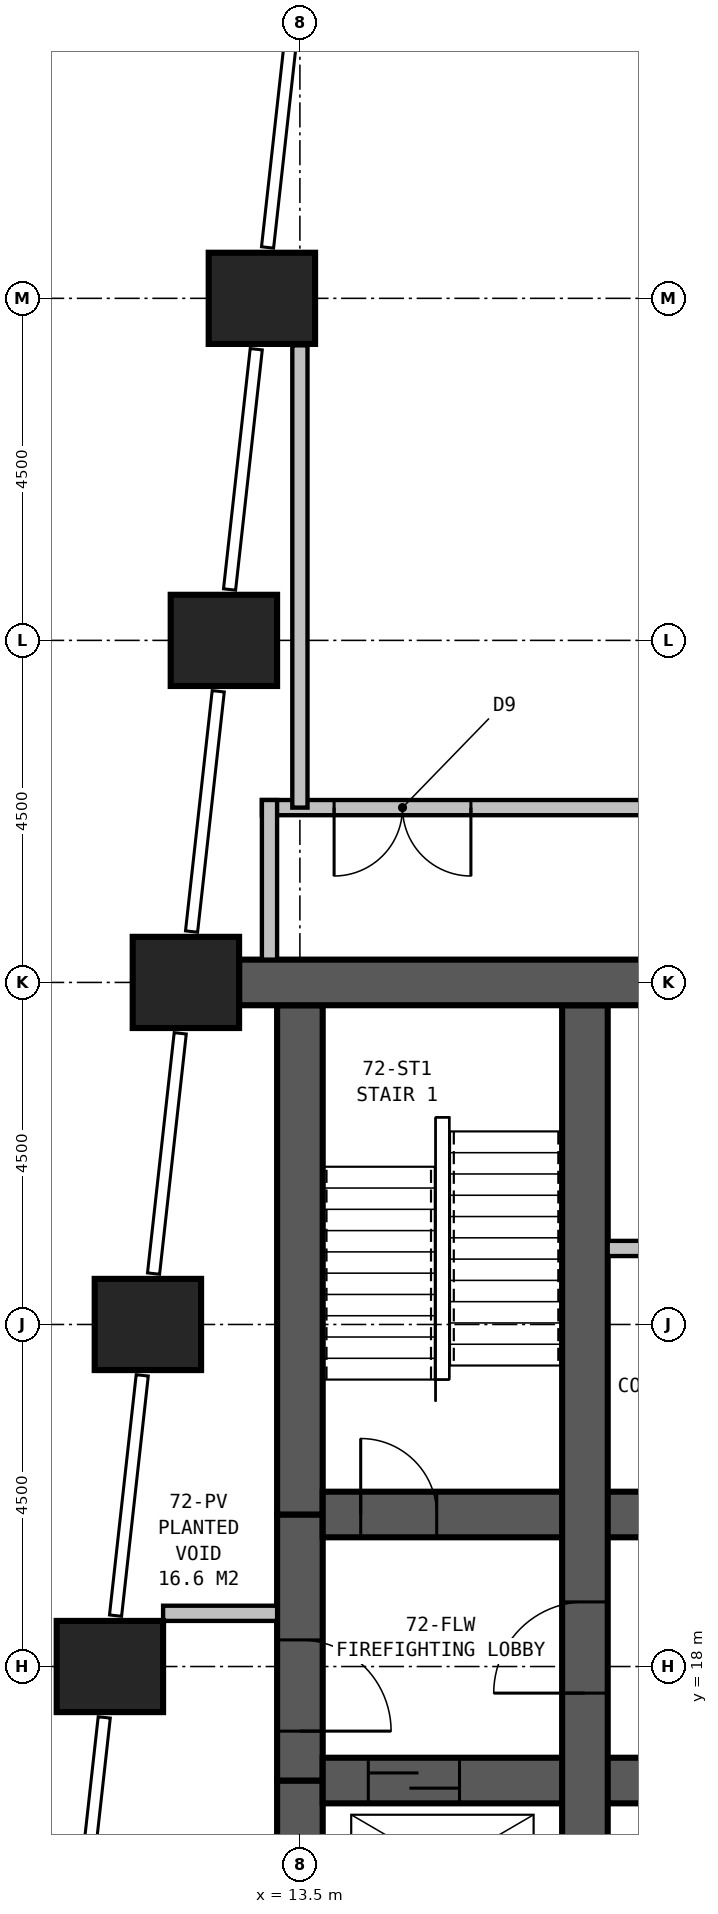
"""IFC4 building model, lengths in metres.
Left out: names, types, materials, properties, quantities, classifications, styles, units other than length and angle.
Written with IfcOpenShell. Run it as: python <this file> out.ifc"""

import sys

from ifc_helpers import new_model, si_unit, direction, frame, frame_2d, origin, origin_2d, place, context, subcontext, project, spatial, rectangle, extrude, element, fill, save


model = new_model("IFC4")
c1 = context("Model", 3, precision=1e-05, world=origin(), true_north=direction((0.0, 1.0)))
c2 = subcontext(c1, "Body", "Model", "MODEL_VIEW")
j1 = project(units=[si_unit("LENGTHUNIT", "METRE"), si_unit("PLANEANGLEUNIT", "RADIAN")], contexts=[c1])
p1 = place(None, origin())
s1 = spatial("IfcSite", under=j1, at=p1, CompositionType="ELEMENT")
p2 = place(p1, origin())
s2 = spatial("IfcBuilding", under=s1, at=p2, CompositionType="ELEMENT")
p3 = place(p2, frame((0.0, 0.0, 281.9)))
s3 = spatial("IfcBuildingStorey", under=s2, at=p3, CompositionType="ELEMENT", Elevation=281.9)
for number, where, z_axis, x_axis in (
    (1, (13.0, 36.0, 0.0), (0.0, 0.0, 1.0), (1.0, 0.0, 0.0)),
    (2, (12.5, 31.5, 0.0), (0.0, 0.0, 1.0), (1.0, 0.0, 0.0)),
    (3, (12.0, 27.0, 0.0), (0.0, 0.0, 1.0), (1.0, 0.0, 0.0)),
    (4, (11.5, 22.5, 0.0), (0.0, 0.0, 1.0), (1.0, 0.0, 0.0)),
    (5, (11.0, 18.0, 0.0), (0.0, 0.0, 1.0), (1.0, 0.0, 0.0)),
):
    element("IfcColumn", number, at=place(p3, frame(where, z_axis=z_axis, x_axis=x_axis)), inside=s3, PredefinedType="COLUMN", context=c2, shape_type="SweptSolid", body=[
        extrude(rectangle(XDim=1.4, YDim=1.2, at=origin_2d()), origin(), (0.0, 0.0, 1.0), 3.9),
    ])
p4 = place(p3, frame((36.3, 27.0, 0.0), z_axis=(0.0, 0.0, 1.0), x_axis=(-1.0, 0.0, 0.0)))
e6 = element("IfcWall", 6, at=p4, inside=s3, PredefinedType="SHEAR", context=c2, shape_type="SweptSolid", body=[
    extrude(rectangle(XDim=23.6, YDim=0.6, at=frame_2d((11.8, 0.0))), origin(), (0.0, 0.0, 1.0), 3.9),
])
p5 = place(p4, frame((17.05, 0.0, 0.0)))
e7 = element("IfcOpeningElement", 7, at=p5, cuts=e6, PredefinedType="OPENING", context=c2, shape_type="SweptSolid", body=[
    extrude(rectangle(XDim=1.0, YDim=2.1, at=frame_2d((0.5, 1.05))), frame((0.0, 0.31, 0.0), z_axis=(0.0, -1.0, 0.0), x_axis=(1.0, 0.0, 0.0)), (0.0, 0.0, 1.0), 0.62),
])
p6 = place(p4, frame((12.05, 0.0, 0.0)))
e8 = element("IfcOpeningElement", 8, at=p6, cuts=e6, PredefinedType="OPENING", context=c2, shape_type="SweptSolid", body=[
    extrude(rectangle(XDim=1.0, YDim=2.1, at=frame_2d((0.5, 1.05))), frame((0.0, 0.31, 0.0), z_axis=(0.0, -1.0, 0.0), x_axis=(1.0, 0.0, 0.0)), (0.0, 0.0, 1.0), 0.62),
])
p7 = place(p4, frame((7.05, 0.0, 0.0)))
e9 = element("IfcOpeningElement", 9, at=p7, cuts=e6, PredefinedType="OPENING", context=c2, shape_type="SweptSolid", body=[
    extrude(rectangle(XDim=1.0, YDim=2.1, at=frame_2d((0.5, 1.05))), frame((0.0, 0.31, 0.0), z_axis=(0.0, -1.0, 0.0), x_axis=(1.0, 0.0, 0.0)), (0.0, 0.0, 1.0), 0.62),
])
p8 = place(p3, frame((17.25, 13.8, 0.0), z_axis=(0.0, 0.0, 1.0), x_axis=(0.0, 1.0, 0.0)))
e10 = element("IfcWall", 10, at=p8, inside=s3, PredefinedType="SHEAR", context=c2, shape_type="SweptSolid", body=[
    extrude(rectangle(XDim=12.9, YDim=0.6, at=frame_2d((6.45, 0.0))), origin(), (0.0, 0.0, 1.0), 3.9),
])
p9 = place(p8, frame((3.85, 0.0, 0.0)))
e11 = element("IfcOpeningElement", 11, at=p9, cuts=e10, PredefinedType="OPENING", context=c2, shape_type="SweptSolid", body=[
    extrude(rectangle(XDim=1.2, YDim=2.1, at=frame_2d((0.6, 1.05))), frame((0.0, 0.31, 0.0), z_axis=(0.0, -1.0, 0.0), x_axis=(1.0, 0.0, 0.0)), (0.0, 0.0, 1.0), 0.62),
])
p10 = place(p3, frame((13.8, 16.5, 0.0), z_axis=(0.0, 0.0, 1.0), x_axis=(1.0, 0.0, 0.0)))
e12 = element("IfcWall", 12, at=p10, inside=s3, PredefinedType="SHEAR", context=c2, shape_type="SweptSolid", body=[
    extrude(rectangle(XDim=21.9, YDim=0.6, at=frame_2d((10.95, 0.0))), origin(), (0.0, 0.0, 1.0), 3.9),
])
p11 = place(p10, frame((5.75, 0.0, 0.0), z_axis=(0.0, 0.0, 1.0), x_axis=(-1.0, 0.0, 0.0)))
e13 = element("IfcOpeningElement", 13, at=p11, cuts=e12, PredefinedType="OPENING", context=c2, shape_type="SweptSolid", body=[
    extrude(rectangle(XDim=1.0, YDim=2.1, at=frame_2d((0.5, 1.05))), frame((0.0, 0.31, 0.0), z_axis=(0.0, -1.0, 0.0), x_axis=(1.0, 0.0, 0.0)), (0.0, 0.0, 1.0), 0.62),
])
p12 = place(p10, frame((10.2, 0.0, 0.0), z_axis=(0.0, 0.0, 1.0), x_axis=(-1.0, 0.0, 0.0)))
e14 = element("IfcOpeningElement", 14, at=p12, cuts=e12, PredefinedType="OPENING", context=c2, shape_type="SweptSolid", body=[
    extrude(rectangle(XDim=1.0, YDim=2.1, at=frame_2d((0.5, 1.05))), frame((0.0, 0.31, 0.0), z_axis=(0.0, -1.0, 0.0), x_axis=(1.0, 0.0, 0.0)), (0.0, 0.0, 1.0), 0.62),
])
p13 = place(p10, frame((12.7, 0.0, 0.0), z_axis=(0.0, 0.0, 1.0), x_axis=(-1.0, 0.0, 0.0)))
e15 = element("IfcOpeningElement", 15, at=p13, cuts=e12, PredefinedType="OPENING", context=c2, shape_type="SweptSolid", body=[
    extrude(rectangle(XDim=1.0, YDim=2.1, at=frame_2d((0.5, 1.05))), frame((0.0, 0.31, 0.0), z_axis=(0.0, -1.0, 0.0), x_axis=(1.0, 0.0, 0.0)), (0.0, 0.0, 1.0), 0.62),
])
p14 = place(p10, frame((17.15, 0.0, 0.0), z_axis=(0.0, 0.0, 1.0), x_axis=(-1.0, 0.0, 0.0)))
e16 = element("IfcOpeningElement", 16, at=p14, cuts=e12, PredefinedType="OPENING", context=c2, shape_type="SweptSolid", body=[
    extrude(rectangle(XDim=1.0, YDim=2.1, at=frame_2d((0.5, 1.05))), frame((0.0, 0.31, 0.0), z_axis=(0.0, -1.0, 0.0), x_axis=(1.0, 0.0, 0.0)), (0.0, 0.0, 1.0), 0.62),
])
p15 = place(p10, frame((0.6, 0.0, 0.0)))
e17 = element("IfcOpeningElement", 17, at=p15, cuts=e12, PredefinedType="OPENING", context=c2, shape_type="SweptSolid", body=[
    extrude(rectangle(XDim=1.2, YDim=2.1, at=frame_2d((0.6, 1.05))), frame((0.0, 0.31, 0.0), z_axis=(0.0, -1.0, 0.0), x_axis=(1.0, 0.0, 0.0)), (0.0, 0.0, 1.0), 0.62),
])
p16 = place(p10, frame((19.6, 0.0, 0.0)))
e18 = element("IfcOpeningElement", 18, at=p16, cuts=e12, PredefinedType="OPENING", context=c2, shape_type="SweptSolid", body=[
    extrude(rectangle(XDim=1.2, YDim=2.1, at=frame_2d((0.6, 1.05))), frame((0.0, 0.31, 0.0), z_axis=(0.0, -1.0, 0.0), x_axis=(1.0, 0.0, 0.0)), (0.0, 0.0, 1.0), 0.62),
])
p17 = place(p3, frame((13.8, 20.0, 0.0), z_axis=(0.0, 0.0, 1.0), x_axis=(1.0, 0.0, 0.0)))
e19 = element("IfcWall", 19, at=p17, inside=s3, PredefinedType="SHEAR", context=c2, shape_type="SweptSolid", body=[
    extrude(rectangle(XDim=21.9, YDim=0.6, at=frame_2d((10.95, 0.0))), origin(), (0.0, 0.0, 1.0), 3.9),
])
p18 = place(p17, frame((0.5, 0.0, 0.0)))
e20 = element("IfcOpeningElement", 20, at=p18, cuts=e19, PredefinedType="OPENING", context=c2, shape_type="SweptSolid", body=[
    extrude(rectangle(XDim=1.0, YDim=2.1, at=frame_2d((0.5, 1.05))), frame((0.0, 0.31, 0.0), z_axis=(0.0, -1.0, 0.0), x_axis=(1.0, 0.0, 0.0)), (0.0, 0.0, 1.0), 0.62),
])
p19 = place(p17, frame((20.5, 0.0, 0.0)))
e21 = element("IfcOpeningElement", 21, at=p19, cuts=e19, PredefinedType="OPENING", context=c2, shape_type="SweptSolid", body=[
    extrude(rectangle(XDim=1.0, YDim=2.1, at=frame_2d((0.5, 1.05))), frame((0.0, 0.31, 0.0), z_axis=(0.0, -1.0, 0.0), x_axis=(1.0, 0.0, 0.0)), (0.0, 0.0, 1.0), 0.62),
])
p20 = place(p17, frame((9.15, 0.0, 0.0)))
e22 = element("IfcOpeningElement", 22, at=p20, cuts=e19, PredefinedType="OPENING", context=c2, shape_type="SweptSolid", body=[
    extrude(rectangle(XDim=1.1, YDim=2.1, at=frame_2d((0.55, 1.05))), frame((0.0, 0.31, 0.0), z_axis=(0.0, -1.0, 0.0), x_axis=(1.0, 0.0, 0.0)), (0.0, 0.0, 1.0), 0.62),
])
p21 = place(p17, frame((11.65, 0.0, 0.0)))
e23 = element("IfcOpeningElement", 23, at=p21, cuts=e19, PredefinedType="OPENING", context=c2, shape_type="SweptSolid", body=[
    extrude(rectangle(XDim=1.1, YDim=2.1, at=frame_2d((0.55, 1.05))), frame((0.0, 0.31, 0.0), z_axis=(0.0, -1.0, 0.0), x_axis=(1.0, 0.0, 0.0)), (0.0, 0.0, 1.0), 0.62),
])
p22 = place(p17, frame((14.15, 0.0, 0.0)))
e24 = element("IfcOpeningElement", 24, at=p22, cuts=e19, PredefinedType="OPENING", context=c2, shape_type="SweptSolid", body=[
    extrude(rectangle(XDim=1.1, YDim=2.1, at=frame_2d((0.55, 1.05))), frame((0.0, 0.31, 0.0), z_axis=(0.0, -1.0, 0.0), x_axis=(1.0, 0.0, 0.0)), (0.0, 0.0, 1.0), 0.62),
])
p23 = place(p17, frame((16.65, 0.0, 0.0)))
e25 = element("IfcOpeningElement", 25, at=p23, cuts=e19, PredefinedType="OPENING", context=c2, shape_type="SweptSolid", body=[
    extrude(rectangle(XDim=1.1, YDim=2.1, at=frame_2d((0.55, 1.05))), frame((0.0, 0.31, 0.0), z_axis=(0.0, -1.0, 0.0), x_axis=(1.0, 0.0, 0.0)), (0.0, 0.0, 1.0), 0.62),
])
p24 = place(p17, frame((5.75, 0.0, 0.0), z_axis=(0.0, 0.0, 1.0), x_axis=(-1.0, 0.0, 0.0)))
e26 = element("IfcOpeningElement", 26, at=p24, cuts=e19, PredefinedType="OPENING", context=c2, shape_type="SweptSolid", body=[
    extrude(rectangle(XDim=1.0, YDim=2.1, at=frame_2d((0.5, 1.05))), frame((0.0, 0.31, 0.0), z_axis=(0.0, -1.0, 0.0), x_axis=(1.0, 0.0, 0.0)), (0.0, 0.0, 1.0), 0.62),
])
p25 = place(p17, frame((6.7, 0.0, 0.0)))
e27 = element("IfcOpeningElement", 27, at=p25, cuts=e19, PredefinedType="OPENING", context=c2, shape_type="SweptSolid", body=[
    extrude(rectangle(XDim=1.0, YDim=2.1, at=frame_2d((0.5, 1.05))), frame((0.0, 0.31, 0.0), z_axis=(0.0, -1.0, 0.0), x_axis=(1.0, 0.0, 0.0)), (0.0, 0.0, 1.0), 0.62),
])
p26 = place(p3, frame((13.5, 26.7, 0.0), z_axis=(0.0, 0.0, 1.0), x_axis=(0.0, -1.0, 0.0)))
e28 = element("IfcWall", 28, at=p26, inside=s3, PredefinedType="SHEAR", context=c2, shape_type="SweptSolid", body=[
    extrude(rectangle(XDim=6.7, YDim=0.6, at=frame_2d((3.35, 0.0))), origin(), (0.0, 0.0, 1.0), 3.9),
])
p27 = place(p3, frame((13.5, 20.0, 0.0), z_axis=(0.0, 0.0, 1.0), x_axis=(0.0, -1.0, 0.0)))
e29 = element("IfcWall", 29, at=p27, inside=s3, PredefinedType="SHEAR", context=c2, shape_type="SweptSolid", body=[
    extrude(rectangle(XDim=3.5, YDim=0.6, at=frame_2d((1.75, 0.0))), origin(), (0.0, 0.0, 1.0), 3.9),
])
p28 = place(p27, frame((1.65, 0.0, 0.0)))
e30 = element("IfcOpeningElement", 30, at=p28, cuts=e29, PredefinedType="OPENING", context=c2, shape_type="SweptSolid", body=[
    extrude(rectangle(XDim=1.2, YDim=2.1, at=frame_2d((0.6, 1.05))), frame((0.0, 0.31, 0.0), z_axis=(0.0, -1.0, 0.0), x_axis=(1.0, 0.0, 0.0)), (0.0, 0.0, 1.0), 0.62),
])
p29 = place(p3, frame((13.5, 16.5, 0.0), z_axis=(0.0, 0.0, 1.0), x_axis=(0.0, -1.0, 0.0)))
e31 = element("IfcWall", 31, at=p29, inside=s3, PredefinedType="SHEAR", context=c2, shape_type="SweptSolid", body=[
    extrude(rectangle(XDim=2.7, YDim=0.6, at=frame_2d((1.35, 0.0))), origin(), (0.0, 0.0, 1.0), 3.9),
])
p30 = place(p3, frame((13.0, 29.3, 0.0), z_axis=(0.0, 0.0, 1.0), x_axis=(1.0, 0.0, 0.0)))
e32 = element("IfcWall", 32, at=p30, inside=s3, PredefinedType="PARTITIONING", context=c2, shape_type="SweptSolid", body=[
    extrude(rectangle(XDim=25.3, YDim=0.2, at=frame_2d((12.65, 0.0))), origin(), (0.0, 0.0, 1.0), 3.65),
])
p31 = place(p30, frame((2.75, 0.0, 0.0), z_axis=(0.0, 0.0, 1.0), x_axis=(-1.0, 0.0, 0.0)))
e33 = element("IfcOpeningElement", 33, at=p31, cuts=e32, PredefinedType="OPENING", context=c2, shape_type="SweptSolid", body=[
    extrude(rectangle(XDim=1.8, YDim=2.4, at=frame_2d((0.9, 1.2))), frame((0.0, 0.11, 0.0), z_axis=(0.0, -1.0, 0.0), x_axis=(1.0, 0.0, 0.0)), (0.0, 0.0, 1.0), 0.22),
])
p32 = place(p30, frame((14.8, 0.0, 0.0)))
e34 = element("IfcOpeningElement", 34, at=p32, cuts=e32, PredefinedType="OPENING", context=c2, shape_type="SweptSolid", body=[
    extrude(rectangle(XDim=1.0, YDim=2.1, at=frame_2d((0.5, 1.05))), frame((0.0, 0.11, 0.0), z_axis=(0.0, -1.0, 0.0), x_axis=(1.0, 0.0, 0.0)), (0.0, 0.0, 1.0), 0.22),
])
p33 = place(p30, frame((18.8, 0.0, 0.0), z_axis=(0.0, 0.0, 1.0), x_axis=(-1.0, 0.0, 0.0)))
e35 = element("IfcOpeningElement", 35, at=p33, cuts=e32, PredefinedType="OPENING", context=c2, shape_type="SweptSolid", body=[
    extrude(rectangle(XDim=1.8, YDim=2.4, at=frame_2d((0.9, 1.2))), frame((0.0, 0.11, 0.0), z_axis=(0.0, -1.0, 0.0), x_axis=(1.0, 0.0, 0.0)), (0.0, 0.0, 1.0), 0.22),
])
p34 = place(p30, frame((23.55, 0.0, 0.0)))
e36 = element("IfcOpeningElement", 36, at=p34, cuts=e32, PredefinedType="OPENING", context=c2, shape_type="SweptSolid", body=[
    extrude(rectangle(XDim=1.2, YDim=2.1, at=frame_2d((0.6, 1.05))), frame((0.0, 0.11, 0.0), z_axis=(0.0, -1.0, 0.0), x_axis=(1.0, 0.0, 0.0)), (0.0, 0.0, 1.0), 0.22),
])
p35 = place(p3, frame((13.5, 29.3, 0.0), z_axis=(0.0, 0.0, 1.0), x_axis=(0.0, 1.0, 0.0)))
e37 = element("IfcWall", 37, at=p35, inside=s3, PredefinedType="PARTITIONING", context=c2, shape_type="SweptSolid", body=[
    extrude(rectangle(XDim=6.082, YDim=0.2, at=frame_2d((3.041, 0.0))), origin(), (0.0, 0.0, 1.0), 2.65),
])
p36 = place(p3, frame((13.2, 18.7, 0.0), z_axis=(0.0, 0.0, 1.0), x_axis=(-1.0, 0.0, 0.0)))
e38 = element("IfcWall", 38, at=p36, inside=s3, PredefinedType="PARTITIONING", context=c2, shape_type="SweptSolid", body=[
    extrude(rectangle(XDim=1.5, YDim=0.2, at=frame_2d((0.75, 0.0))), origin(), (0.0, 0.0, 1.0), 3.65),
])
p37 = place(p3, frame((13.1, 27.3, 0.0), z_axis=(0.0, 0.0, 1.0), x_axis=(0.0, 1.0, 0.0)))
e39 = element("IfcWall", 39, at=p37, inside=s3, PredefinedType="PARTITIONING", context=c2, shape_type="SweptSolid", body=[
    extrude(rectangle(XDim=2.1, YDim=0.2, at=frame_2d((1.05, 0.0))), origin(), (0.0, 0.0, 1.0), 3.65),
])
p38 = place(p3, frame((17.55, 23.5, 0.0), z_axis=(0.0, 0.0, 1.0), x_axis=(1.0, 0.0, 0.0)))
e40 = element("IfcWall", 40, at=p38, inside=s3, PredefinedType="PARTITIONING", context=c2, shape_type="SweptSolid", body=[
    extrude(rectangle(XDim=14.4, YDim=0.2, at=frame_2d((7.2, 0.0))), origin(), (0.0, 0.0, 1.0), 3.65),
])
p39 = place(p38, frame((0.45, 0.0, 0.0)))
e41 = element("IfcOpeningElement", 41, at=p39, cuts=e40, PredefinedType="OPENING", context=c2, shape_type="SweptSolid", body=[
    extrude(rectangle(XDim=1.0, YDim=2.1, at=frame_2d((0.5, 1.05))), frame((0.0, 0.11, 0.0), z_axis=(0.0, -1.0, 0.0), x_axis=(1.0, 0.0, 0.0)), (0.0, 0.0, 1.0), 0.22),
])
p40 = place(p31, origin())
e42 = element("IfcDoor", 42, at=p40, inside=s3, OperationType="DOUBLE_DOOR_SINGLE_SWING", PredefinedType="DOOR", context=c2, shape_type="SweptSolid", body=[
    extrude(rectangle(XDim=1.8, YDim=2.4, at=frame_2d((0.9, 1.2))), frame((0.0, 0.025, 0.0), z_axis=(0.0, -1.0, 0.0), x_axis=(1.0, 0.0, 0.0)), (0.0, 0.0, 1.0), 0.05),
])
fill(e33, e42)
p41 = place(p28, origin())
e43 = element("IfcDoor", 43, at=p41, inside=s3, OperationType="SINGLE_SWING_RIGHT", PredefinedType="DOOR", context=c2, shape_type="SweptSolid", body=[
    extrude(rectangle(XDim=1.2, YDim=2.1, at=frame_2d((0.6, 1.05))), frame((0.0, 0.3, 0.0), z_axis=(0.0, -1.0, 0.0), x_axis=(1.0, 0.0, 0.0)), (0.0, 0.0, 1.0), 0.6),
])
fill(e30, e43)
p42 = place(p9, origin())
e44 = element("IfcDoor", 44, at=p42, inside=s3, OperationType="SINGLE_SWING_LEFT", PredefinedType="DOOR", context=c2, shape_type="SweptSolid", body=[
    extrude(rectangle(XDim=1.2, YDim=2.1, at=frame_2d((0.6, 1.05))), frame((0.0, 0.3, 0.0), z_axis=(0.0, -1.0, 0.0), x_axis=(1.0, 0.0, 0.0)), (0.0, 0.0, 1.0), 0.6),
])
fill(e11, e44)
p43 = place(p18, origin())
e45 = element("IfcDoor", 45, at=p43, inside=s3, OperationType="SINGLE_SWING_LEFT", PredefinedType="DOOR", context=c2, shape_type="SweptSolid", body=[
    extrude(rectangle(XDim=1.0, YDim=2.1, at=frame_2d((0.5, 1.05))), frame((0.0, 0.3, 0.0), z_axis=(0.0, -1.0, 0.0), x_axis=(1.0, 0.0, 0.0)), (0.0, 0.0, 1.0), 0.6),
])
fill(e20, e45)
p44 = place(p15, origin())
e46 = element("IfcDoor", 46, at=p44, inside=s3, OperationType="SLIDING_TO_LEFT", PredefinedType="DOOR", context=c2, shape_type="SweptSolid", body=[
    extrude(rectangle(XDim=1.2, YDim=2.1, at=frame_2d((0.6, 1.05))), frame((0.0, 0.3, 0.0), z_axis=(0.0, -1.0, 0.0), x_axis=(1.0, 0.0, 0.0)), (0.0, 0.0, 1.0), 0.6),
])
fill(e17, e46)
save(model, sys.argv[1])
